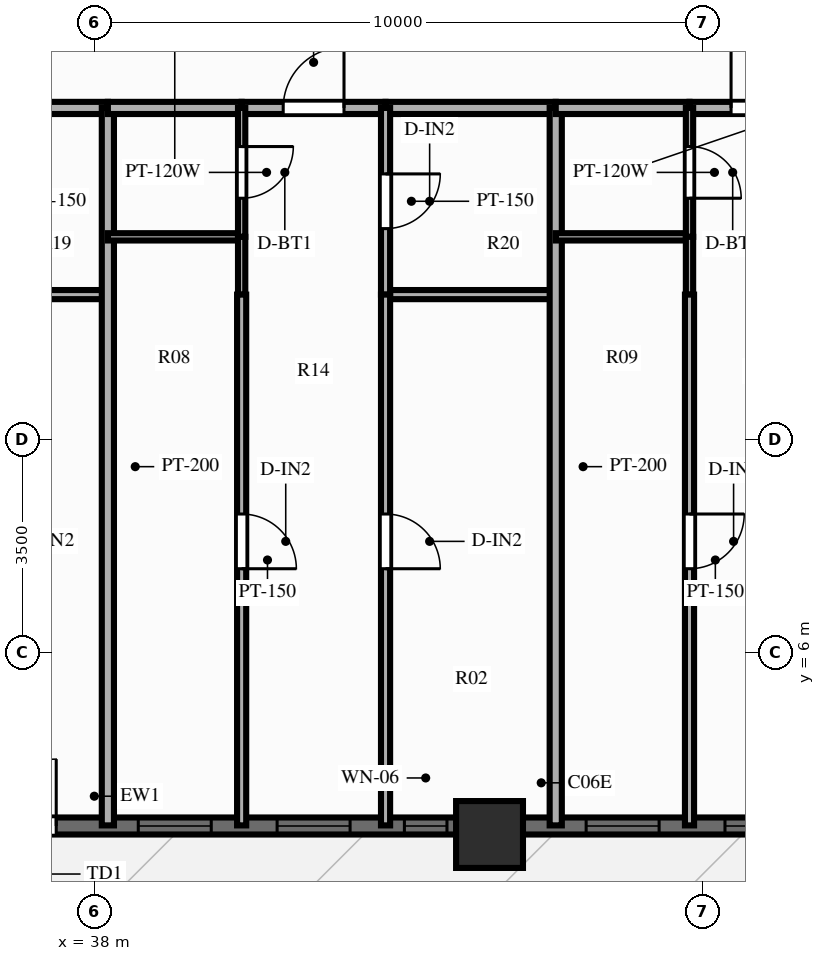
"""IFC4 building model, lengths in metres.
Left out: names, types, materials, properties, quantities, classifications, styles, units other than length and angle.
Written with IfcOpenShell. Run it as: python <this file> out.ifc"""

import sys

from ifc_helpers import new_model, si_unit, direction, frame, frame_2d, origin, origin_2d, place, context, subcontext, project, spatial, rectangle, extrude, source, transform, mapped, element, fill, save


model = new_model("IFC4")
c1 = context("Model", 3, precision=1e-05, world=origin(), true_north=direction((0.0, 1.0)))
c2 = subcontext(c1, "Body", "Model", "MODEL_VIEW")
j1 = project(units=[si_unit("LENGTHUNIT", "METRE"), si_unit("PLANEANGLEUNIT", "RADIAN")], contexts=[c1])
p1 = place(None, origin())
s1 = spatial("IfcSite", under=j1, at=p1, CompositionType="ELEMENT")
p2 = place(p1, origin())
s2 = spatial("IfcBuilding", under=s1, at=p2, CompositionType="ELEMENT")
p3 = place(p2, frame((0.0, 0.0, 25.4)))
s3 = spatial("IfcBuildingStorey", under=s2, at=p3, CompositionType="ELEMENT", Elevation=25.4)
m1 = source(origin(), c2, "Body", "SweptSolid", [
    extrude(rectangle(XDim=1.1, YDim=1.1, at=origin_2d()), origin(), (0.0, 0.0, 1.0), 3.0),
])
p4 = place(p3, frame((44.5, 3.0, 0.0), z_axis=(0.0, 0.0, 1.0), x_axis=(1.0, 0.0, 0.0)))
e1 = element("IfcColumn", 1, at=p4, inside=s3, PredefinedType="COLUMN", context=c2, shape_type="MappedRepresentation", body=[
    mapped(m1, transform((0.0, 0.0, 0.0), scale=1.0)),
])
p5 = place(p3, frame((15.5, 3.14, 0.0), z_axis=(0.0, 0.0, 1.0), x_axis=(1.0, 0.0, 0.0)))
e2 = element("IfcWall", 2, at=p5, inside=s3, PredefinedType="SOLIDWALL", context=c2, shape_type="SweptSolid", body=[
    extrude(rectangle(XDim=45.0, YDim=0.28, at=frame_2d((22.5, 0.0))), origin(), (0.0, 0.0, 1.0), 2.28),
])
p6 = place(p5, frame((0.785, 0.0, 0.25)))
e3 = element("IfcOpeningElement", 3, at=p6, cuts=e2, PredefinedType="OPENING", context=c2, shape_type="SweptSolid", body=[
    extrude(rectangle(XDim=1.2, YDim=1.5, at=frame_2d((0.6, 0.75))), frame((0.0, 0.152, 0.0), z_axis=(0.0, -1.0, 0.0), x_axis=(1.0, 0.0, 0.0)), (0.0, 0.0, 1.0), 0.304),
])
p7 = place(p5, frame((3.033, 0.0, 0.25)))
e4 = element("IfcOpeningElement", 4, at=p7, cuts=e2, PredefinedType="OPENING", context=c2, shape_type="SweptSolid", body=[
    extrude(rectangle(XDim=1.2, YDim=1.5, at=frame_2d((0.6, 0.75))), frame((0.0, 0.152, 0.0), z_axis=(0.0, -1.0, 0.0), x_axis=(1.0, 0.0, 0.0)), (0.0, 0.0, 1.0), 0.304),
])
p8 = place(p5, frame((5.727, 0.0, 0.25)))
e5 = element("IfcOpeningElement", 5, at=p8, cuts=e2, PredefinedType="OPENING", context=c2, shape_type="SweptSolid", body=[
    extrude(rectangle(XDim=1.2, YDim=1.5, at=frame_2d((0.6, 0.75))), frame((0.0, 0.152, 0.0), z_axis=(0.0, -1.0, 0.0), x_axis=(1.0, 0.0, 0.0)), (0.0, 0.0, 1.0), 0.304),
])
p9 = place(p5, frame((8.269, 0.0, 0.25)))
e6 = element("IfcOpeningElement", 6, at=p9, cuts=e2, PredefinedType="OPENING", context=c2, shape_type="SweptSolid", body=[
    extrude(rectangle(XDim=1.2, YDim=1.5, at=frame_2d((0.6, 0.75))), frame((0.0, 0.152, 0.0), z_axis=(0.0, -1.0, 0.0), x_axis=(1.0, 0.0, 0.0)), (0.0, 0.0, 1.0), 0.304),
])
p10 = place(p5, frame((10.621, 0.0, 0.25)))
e7 = element("IfcOpeningElement", 7, at=p10, cuts=e2, PredefinedType="OPENING", context=c2, shape_type="SweptSolid", body=[
    extrude(rectangle(XDim=1.2, YDim=1.5, at=frame_2d((0.6, 0.75))), frame((0.0, 0.152, 0.0), z_axis=(0.0, -1.0, 0.0), x_axis=(1.0, 0.0, 0.0)), (0.0, 0.0, 1.0), 0.304),
])
p11 = place(p5, frame((13.316, 0.0, 0.25)))
e8 = element("IfcOpeningElement", 8, at=p11, cuts=e2, PredefinedType="OPENING", context=c2, shape_type="SweptSolid", body=[
    extrude(rectangle(XDim=1.2, YDim=1.5, at=frame_2d((0.6, 0.75))), frame((0.0, 0.152, 0.0), z_axis=(0.0, -1.0, 0.0), x_axis=(1.0, 0.0, 0.0)), (0.0, 0.0, 1.0), 0.304),
])
p12 = place(p5, frame((16.624, 0.0, 0.25)))
e9 = element("IfcOpeningElement", 9, at=p12, cuts=e2, PredefinedType="OPENING", context=c2, shape_type="SweptSolid", body=[
    extrude(rectangle(XDim=0.7, YDim=1.5, at=frame_2d((0.35, 0.75))), frame((0.0, 0.152, 0.0), z_axis=(0.0, -1.0, 0.0), x_axis=(1.0, 0.0, 0.0)), (0.0, 0.0, 1.0), 0.304),
])
p13 = place(p5, frame((18.141, 0.0, 0.25)))
e10 = element("IfcOpeningElement", 10, at=p13, cuts=e2, PredefinedType="OPENING", context=c2, shape_type="SweptSolid", body=[
    extrude(rectangle(XDim=1.2, YDim=1.5, at=frame_2d((0.6, 0.75))), frame((0.0, 0.152, 0.0), z_axis=(0.0, -1.0, 0.0), x_axis=(1.0, 0.0, 0.0)), (0.0, 0.0, 1.0), 0.304),
])
p14 = place(p5, frame((21.874, 0.0, 0.0), z_axis=(0.0, 0.0, 1.0), x_axis=(-1.0, 0.0, 0.0)))
e11 = element("IfcOpeningElement", 11, at=p14, cuts=e2, PredefinedType="OPENING", context=c2, shape_type="SweptSolid", body=[
    extrude(rectangle(XDim=1.1, YDim=2.15, at=frame_2d((0.55, 1.075))), frame((0.0, 0.152, 0.0), z_axis=(0.0, -1.0, 0.0), x_axis=(1.0, 0.0, 0.0)), (0.0, 0.0, 1.0), 0.304),
])
p15 = place(p5, frame((23.223, 0.0, 0.25)))
e12 = element("IfcOpeningElement", 12, at=p15, cuts=e2, PredefinedType="OPENING", context=c2, shape_type="SweptSolid", body=[
    extrude(rectangle(XDim=1.2, YDim=1.5, at=frame_2d((0.6, 0.75))), frame((0.0, 0.152, 0.0), z_axis=(0.0, -1.0, 0.0), x_axis=(1.0, 0.0, 0.0)), (0.0, 0.0, 1.0), 0.304),
])
p16 = place(p5, frame((25.507, 0.0, 0.25)))
e13 = element("IfcOpeningElement", 13, at=p16, cuts=e2, PredefinedType="OPENING", context=c2, shape_type="SweptSolid", body=[
    extrude(rectangle(XDim=1.2, YDim=1.5, at=frame_2d((0.6, 0.75))), frame((0.0, 0.152, 0.0), z_axis=(0.0, -1.0, 0.0), x_axis=(1.0, 0.0, 0.0)), (0.0, 0.0, 1.0), 0.304),
])
p17 = place(p5, frame((27.6, 0.0, 0.25)))
e14 = element("IfcOpeningElement", 14, at=p17, cuts=e2, PredefinedType="OPENING", context=c2, shape_type="SweptSolid", body=[
    extrude(rectangle(XDim=0.7, YDim=1.5, at=frame_2d((0.35, 0.75))), frame((0.0, 0.152, 0.0), z_axis=(0.0, -1.0, 0.0), x_axis=(1.0, 0.0, 0.0)), (0.0, 0.0, 1.0), 0.304),
])
p18 = place(p5, frame((30.589, 0.0, 0.25)))
e15 = element("IfcOpeningElement", 15, at=p18, cuts=e2, PredefinedType="OPENING", context=c2, shape_type="SweptSolid", body=[
    extrude(rectangle(XDim=1.2, YDim=1.5, at=frame_2d((0.6, 0.75))), frame((0.0, 0.152, 0.0), z_axis=(0.0, -1.0, 0.0), x_axis=(1.0, 0.0, 0.0)), (0.0, 0.0, 1.0), 0.304),
])
p19 = place(p5, frame((32.872, 0.0, 0.25)))
e16 = element("IfcOpeningElement", 16, at=p19, cuts=e2, PredefinedType="OPENING", context=c2, shape_type="SweptSolid", body=[
    extrude(rectangle(XDim=1.2, YDim=1.5, at=frame_2d((0.6, 0.75))), frame((0.0, 0.152, 0.0), z_axis=(0.0, -1.0, 0.0), x_axis=(1.0, 0.0, 0.0)), (0.0, 0.0, 1.0), 0.304),
])
p20 = place(p5, frame((35.455, 0.0, 0.25)))
e17 = element("IfcOpeningElement", 17, at=p20, cuts=e2, PredefinedType="OPENING", context=c2, shape_type="SweptSolid", body=[
    extrude(rectangle(XDim=1.2, YDim=1.5, at=frame_2d((0.6, 0.75))), frame((0.0, 0.152, 0.0), z_axis=(0.0, -1.0, 0.0), x_axis=(1.0, 0.0, 0.0)), (0.0, 0.0, 1.0), 0.304),
])
p21 = place(p5, frame((37.954, 0.0, 0.25)))
e18 = element("IfcOpeningElement", 18, at=p21, cuts=e2, PredefinedType="OPENING", context=c2, shape_type="SweptSolid", body=[
    extrude(rectangle(XDim=1.2, YDim=1.5, at=frame_2d((0.6, 0.75))), frame((0.0, 0.152, 0.0), z_axis=(0.0, -1.0, 0.0), x_axis=(1.0, 0.0, 0.0)), (0.0, 0.0, 1.0), 0.304),
])
p22 = place(p5, frame((40.238, 0.0, 0.25)))
e19 = element("IfcOpeningElement", 19, at=p22, cuts=e2, PredefinedType="OPENING", context=c2, shape_type="SweptSolid", body=[
    extrude(rectangle(XDim=1.2, YDim=1.5, at=frame_2d((0.6, 0.75))), frame((0.0, 0.152, 0.0), z_axis=(0.0, -1.0, 0.0), x_axis=(1.0, 0.0, 0.0)), (0.0, 0.0, 1.0), 0.304),
])
p23 = place(p5, frame((42.716, 0.0, 0.25)))
e20 = element("IfcOpeningElement", 20, at=p23, cuts=e2, PredefinedType="OPENING", context=c2, shape_type="SweptSolid", body=[
    extrude(rectangle(XDim=1.2, YDim=1.5, at=frame_2d((0.6, 0.75))), frame((0.0, 0.152, 0.0), z_axis=(0.0, -1.0, 0.0), x_axis=(1.0, 0.0, 0.0)), (0.0, 0.0, 1.0), 0.304),
])
p24 = place(p3, frame((35.424, 14.95, 0.0), z_axis=(0.0, 0.0, 1.0), x_axis=(1.0, 0.0, 0.0)))
e21 = element("IfcWall", 21, at=p24, inside=s3, PredefinedType="PARTITIONING", context=c2, shape_type="SweptSolid", body=[
    extrude(rectangle(XDim=2.799, YDim=0.2, at=frame_2d((1.399, 0.0))), origin(), (0.0, 0.0, 1.0), 2.79),
])
p25 = place(p3, frame((35.424, 11.88, 0.0), z_axis=(0.0, 0.0, 1.0), x_axis=(1.0, 0.0, 0.0)))
e22 = element("IfcWall", 22, at=p25, inside=s3, PredefinedType="PARTITIONING", context=c2, shape_type="SweptSolid", body=[
    extrude(rectangle(XDim=2.799, YDim=0.15, at=frame_2d((1.399, 0.0))), origin(), (0.0, 0.0, 1.0), 2.79),
])
p26 = place(p3, frame((38.223, 14.95, 0.0), z_axis=(0.0, 0.0, 1.0), x_axis=(0.0, -1.0, 0.0)))
e23 = element("IfcWall", 23, at=p26, inside=s3, PredefinedType="PARTITIONING", context=c2, shape_type="SweptSolid", body=[
    extrude(rectangle(XDim=11.8, YDim=0.2, at=frame_2d((5.9, 0.0))), origin(), (0.0, 0.0, 1.0), 2.79),
])
p27 = place(p3, frame((38.223, 14.95, 0.0), z_axis=(0.0, 0.0, 1.0), x_axis=(1.0, 0.0, 0.0)))
e24 = element("IfcWall", 24, at=p27, inside=s3, PredefinedType="PARTITIONING", context=c2, shape_type="SweptSolid", body=[
    extrude(rectangle(XDim=2.2, YDim=0.2, at=frame_2d((1.1, 0.0))), origin(), (0.0, 0.0, 1.0), 2.79),
])
p28 = place(p3, frame((40.423, 14.95, 0.0), z_axis=(0.0, 0.0, 1.0), x_axis=(1.0, 0.0, 0.0)))
e25 = element("IfcWall", 25, at=p28, inside=s3, PredefinedType="PARTITIONING", context=c2, shape_type="SweptSolid", body=[
    extrude(rectangle(XDim=2.367, YDim=0.2, at=frame_2d((1.183, 0.0))), origin(), (0.0, 0.0, 1.0), 2.79),
])
p29 = place(p28, frame((0.683, 0.0, 0.0)))
e26 = element("IfcOpeningElement", 26, at=p29, cuts=e25, PredefinedType="OPENING", context=c2, shape_type="SweptSolid", body=[
    extrude(rectangle(XDim=1.0, YDim=2.15, at=frame_2d((0.5, 1.075))), frame((0.0, 0.112, 0.0), z_axis=(0.0, -1.0, 0.0), x_axis=(1.0, 0.0, 0.0)), (0.0, 0.0, 1.0), 0.224),
])
p30 = place(p3, frame((42.79, 14.95, 0.0), z_axis=(0.0, 0.0, 1.0), x_axis=(1.0, 0.0, 0.0)))
e27 = element("IfcWall", 27, at=p30, inside=s3, PredefinedType="PARTITIONING", context=c2, shape_type="SweptSolid", body=[
    extrude(rectangle(XDim=2.799, YDim=0.2, at=frame_2d((1.399, 0.0))), origin(), (0.0, 0.0, 1.0), 2.79),
])
p31 = place(p3, frame((38.223, 12.83, 0.0), z_axis=(0.0, 0.0, 1.0), x_axis=(1.0, 0.0, 0.0)))
e28 = element("IfcWall", 28, at=p31, inside=s3, PredefinedType="PARTITIONING", context=c2, shape_type="SweptSolid", body=[
    extrude(rectangle(XDim=2.2, YDim=0.12, at=frame_2d((1.1, 0.0))), origin(), (0.0, 0.0, 1.0), 2.79),
])
p32 = place(p3, frame((42.79, 11.88, 0.0), z_axis=(0.0, 0.0, 1.0), x_axis=(1.0, 0.0, 0.0)))
e29 = element("IfcWall", 29, at=p32, inside=s3, PredefinedType="PARTITIONING", context=c2, shape_type="SweptSolid", body=[
    extrude(rectangle(XDim=2.799, YDim=0.15, at=frame_2d((1.399, 0.0))), origin(), (0.0, 0.0, 1.0), 2.79),
])
p33 = place(p3, frame((40.423, 14.95, 0.0), z_axis=(0.0, 0.0, 1.0), x_axis=(0.0, -1.0, 0.0)))
e30 = element("IfcWall", 30, at=p33, inside=s3, PredefinedType="PARTITIONING", context=c2, shape_type="SweptSolid", body=[
    extrude(rectangle(XDim=2.12, YDim=0.12, at=frame_2d((1.06, 0.0))), origin(), (0.0, 0.0, 1.0), 2.79),
])
p34 = place(p33, frame((0.635, 0.0, 0.0)))
e31 = element("IfcOpeningElement", 31, at=p34, cuts=e30, PredefinedType="OPENING", context=c2, shape_type="SweptSolid", body=[
    extrude(rectangle(XDim=0.85, YDim=2.05, at=frame_2d((0.425, 1.025))), frame((0.0, 0.072, 0.0), z_axis=(0.0, -1.0, 0.0), x_axis=(1.0, 0.0, 0.0)), (0.0, 0.0, 1.0), 0.144),
])
p35 = place(p3, frame((40.423, 12.83, 0.0), z_axis=(0.0, 0.0, 1.0), x_axis=(0.0, -1.0, 0.0)))
e32 = element("IfcWall", 32, at=p35, inside=s3, PredefinedType="PARTITIONING", context=c2, shape_type="SweptSolid", body=[
    extrude(rectangle(XDim=0.95, YDim=0.12, at=frame_2d((0.475, 0.0))), origin(), (0.0, 0.0, 1.0), 2.79),
])
p36 = place(p3, frame((40.423, 11.88, 0.0), z_axis=(0.0, 0.0, 1.0), x_axis=(0.0, -1.0, 0.0)))
e33 = element("IfcWall", 33, at=p36, inside=s3, PredefinedType="PARTITIONING", context=c2, shape_type="SweptSolid", body=[
    extrude(rectangle(XDim=8.73, YDim=0.15, at=frame_2d((4.365, 0.0))), origin(), (0.0, 0.0, 1.0), 2.79),
])
p37 = place(p36, frame((3.609, 0.0, 0.0)))
e34 = element("IfcOpeningElement", 34, at=p37, cuts=e33, PredefinedType="OPENING", context=c2, shape_type="SweptSolid", body=[
    extrude(rectangle(XDim=0.9, YDim=2.1, at=frame_2d((0.45, 1.05))), frame((0.0, 0.087, 0.0), z_axis=(0.0, -1.0, 0.0), x_axis=(1.0, 0.0, 0.0)), (0.0, 0.0, 1.0), 0.174),
])
p38 = place(p3, frame((42.79, 14.95, 0.0), z_axis=(0.0, 0.0, 1.0), x_axis=(0.0, -1.0, 0.0)))
e35 = element("IfcWall", 35, at=p38, inside=s3, PredefinedType="PARTITIONING", context=c2, shape_type="SweptSolid", body=[
    extrude(rectangle(XDim=3.07, YDim=0.15, at=frame_2d((1.535, 0.0))), origin(), (0.0, 0.0, 1.0), 2.79),
])
p39 = place(p38, frame((1.085, 0.0, 0.0)))
e36 = element("IfcOpeningElement", 36, at=p39, cuts=e35, PredefinedType="OPENING", context=c2, shape_type="SweptSolid", body=[
    extrude(rectangle(XDim=0.9, YDim=2.1, at=frame_2d((0.45, 1.05))), frame((0.0, 0.087, 0.0), z_axis=(0.0, -1.0, 0.0), x_axis=(1.0, 0.0, 0.0)), (0.0, 0.0, 1.0), 0.174),
])
p40 = place(p3, frame((42.79, 11.88, 0.0), z_axis=(0.0, 0.0, 1.0), x_axis=(0.0, -1.0, 0.0)))
e37 = element("IfcWall", 37, at=p40, inside=s3, PredefinedType="PARTITIONING", context=c2, shape_type="SweptSolid", body=[
    extrude(rectangle(XDim=8.73, YDim=0.15, at=frame_2d((4.365, 0.0))), origin(), (0.0, 0.0, 1.0), 2.79),
])
p41 = place(p40, frame((3.609, 0.0, 0.0)))
e38 = element("IfcOpeningElement", 38, at=p41, cuts=e37, PredefinedType="OPENING", context=c2, shape_type="SweptSolid", body=[
    extrude(rectangle(XDim=0.9, YDim=2.1, at=frame_2d((0.45, 1.05))), frame((0.0, 0.087, 0.0), z_axis=(0.0, -1.0, 0.0), x_axis=(1.0, 0.0, 0.0)), (0.0, 0.0, 1.0), 0.174),
])
p42 = place(p3, frame((45.589, 14.95, 0.0), z_axis=(0.0, 0.0, 1.0), x_axis=(0.0, -1.0, 0.0)))
e39 = element("IfcWall", 39, at=p42, inside=s3, PredefinedType="PARTITIONING", context=c2, shape_type="SweptSolid", body=[
    extrude(rectangle(XDim=11.8, YDim=0.2, at=frame_2d((5.9, 0.0))), origin(), (0.0, 0.0, 1.0), 2.24),
])
p43 = place(p3, frame((45.589, 14.95, 0.0), z_axis=(0.0, 0.0, 1.0), x_axis=(1.0, 0.0, 0.0)))
e40 = element("IfcWall", 40, at=p43, inside=s3, PredefinedType="PARTITIONING", context=c2, shape_type="SweptSolid", body=[
    extrude(rectangle(XDim=2.2, YDim=0.2, at=frame_2d((1.1, 0.0))), origin(), (0.0, 0.0, 1.0), 2.79),
])
p44 = place(p3, frame((47.789, 14.95, 0.0), z_axis=(0.0, 0.0, 1.0), x_axis=(1.0, 0.0, 0.0)))
e41 = element("IfcWall", 41, at=p44, inside=s3, PredefinedType="PARTITIONING", context=c2, shape_type="SweptSolid", body=[
    extrude(rectangle(XDim=2.367, YDim=0.2, at=frame_2d((1.183, 0.0))), origin(), (0.0, 0.0, 1.0), 2.79),
])
p45 = place(p44, frame((0.683, 0.0, 0.0)))
e42 = element("IfcOpeningElement", 42, at=p45, cuts=e41, PredefinedType="OPENING", context=c2, shape_type="SweptSolid", body=[
    extrude(rectangle(XDim=1.0, YDim=2.15, at=frame_2d((0.5, 1.075))), frame((0.0, 0.112, 0.0), z_axis=(0.0, -1.0, 0.0), x_axis=(1.0, 0.0, 0.0)), (0.0, 0.0, 1.0), 0.224),
])
p46 = place(p3, frame((45.589, 12.83, 0.0), z_axis=(0.0, 0.0, 1.0), x_axis=(1.0, 0.0, 0.0)))
e43 = element("IfcWall", 43, at=p46, inside=s3, PredefinedType="PARTITIONING", context=c2, shape_type="SweptSolid", body=[
    extrude(rectangle(XDim=2.2, YDim=0.12, at=frame_2d((1.1, 0.0))), origin(), (0.0, 0.0, 1.0), 2.79),
])
p47 = place(p3, frame((47.789, 14.95, 0.0), z_axis=(0.0, 0.0, 1.0), x_axis=(0.0, -1.0, 0.0)))
e44 = element("IfcWall", 44, at=p47, inside=s3, PredefinedType="PARTITIONING", context=c2, shape_type="SweptSolid", body=[
    extrude(rectangle(XDim=2.12, YDim=0.12, at=frame_2d((1.06, 0.0))), origin(), (0.0, 0.0, 1.0), 2.79),
])
p48 = place(p47, frame((0.635, 0.0, 0.0)))
e45 = element("IfcOpeningElement", 45, at=p48, cuts=e44, PredefinedType="OPENING", context=c2, shape_type="SweptSolid", body=[
    extrude(rectangle(XDim=0.85, YDim=2.05, at=frame_2d((0.425, 1.025))), frame((0.0, 0.072, 0.0), z_axis=(0.0, -1.0, 0.0), x_axis=(1.0, 0.0, 0.0)), (0.0, 0.0, 1.0), 0.144),
])
p49 = place(p3, frame((47.789, 12.83, 0.0), z_axis=(0.0, 0.0, 1.0), x_axis=(0.0, -1.0, 0.0)))
e46 = element("IfcWall", 46, at=p49, inside=s3, PredefinedType="PARTITIONING", context=c2, shape_type="SweptSolid", body=[
    extrude(rectangle(XDim=0.95, YDim=0.12, at=frame_2d((0.475, 0.0))), origin(), (0.0, 0.0, 1.0), 2.79),
])
p50 = place(p3, frame((47.789, 11.88, 0.0), z_axis=(0.0, 0.0, 1.0), x_axis=(0.0, -1.0, 0.0)))
e47 = element("IfcWall", 47, at=p50, inside=s3, PredefinedType="PARTITIONING", context=c2, shape_type="SweptSolid", body=[
    extrude(rectangle(XDim=8.73, YDim=0.15, at=frame_2d((4.365, 0.0))), origin(), (0.0, 0.0, 1.0), 2.79),
])
p51 = place(p50, frame((3.609, 0.0, 0.0)))
e48 = element("IfcOpeningElement", 48, at=p51, cuts=e47, PredefinedType="OPENING", context=c2, shape_type="SweptSolid", body=[
    extrude(rectangle(XDim=0.9, YDim=2.1, at=frame_2d((0.45, 1.05))), frame((0.0, 0.087, 0.0), z_axis=(0.0, -1.0, 0.0), x_axis=(1.0, 0.0, 0.0)), (0.0, 0.0, 1.0), 0.174),
])
m2 = source(origin(), c2, "Body", "SweptSolid", [
    extrude(rectangle(XDim=1.1, YDim=2.15, at=frame_2d((0.55, 1.075))), frame((0.0, 0.025, 0.0), z_axis=(0.0, -1.0, 0.0), x_axis=(1.0, 0.0, 0.0)), (0.0, 0.0, 1.0), 0.05),
])
p52 = place(p14, origin())
e49 = element("IfcDoor", 49, at=p52, inside=s3, OperationType="SINGLE_SWING_LEFT", PredefinedType="DOOR", context=c2, shape_type="MappedRepresentation", body=[
    mapped(m2, transform((0.0, 0.0, 0.0), scale=1.0)),
])
fill(e11, e49)
m3 = source(origin(), c2, "Body", "SweptSolid", [
    extrude(rectangle(XDim=1.2, YDim=1.5, at=frame_2d((0.6, 0.75))), frame((0.0, 0.03, 0.0), z_axis=(0.0, -1.0, 0.0), x_axis=(1.0, 0.0, 0.0)), (0.0, 0.0, 1.0), 0.06),
])
p53 = place(p15, origin())
e50 = element("IfcWindow", 50, at=p53, inside=s3, PartitioningType="SINGLE_PANEL", PredefinedType="WINDOW", context=c2, shape_type="MappedRepresentation", body=[
    mapped(m3, transform((0.0, 0.0, 0.0), scale=1.0)),
])
fill(e12, e50)
p54 = place(p16, origin())
e51 = element("IfcWindow", 51, at=p54, inside=s3, PartitioningType="SINGLE_PANEL", PredefinedType="WINDOW", context=c2, shape_type="MappedRepresentation", body=[
    mapped(m3, transform((0.0, 0.0, 0.0), scale=1.0)),
])
fill(e13, e51)
m4 = source(origin(), c2, "Body", "SweptSolid", [
    extrude(rectangle(XDim=0.7, YDim=1.5, at=frame_2d((0.35, 0.75))), frame((0.0, 0.03, 0.0), z_axis=(0.0, -1.0, 0.0), x_axis=(1.0, 0.0, 0.0)), (0.0, 0.0, 1.0), 0.06),
])
p55 = place(p17, origin())
e52 = element("IfcWindow", 52, at=p55, inside=s3, PartitioningType="SINGLE_PANEL", PredefinedType="WINDOW", context=c2, shape_type="MappedRepresentation", body=[
    mapped(m4, transform((0.0, 0.0, 0.0), scale=1.0)),
])
fill(e14, e52)
p56 = place(p18, origin())
e53 = element("IfcWindow", 53, at=p56, inside=s3, PartitioningType="SINGLE_PANEL", PredefinedType="WINDOW", context=c2, shape_type="MappedRepresentation", body=[
    mapped(m3, transform((0.0, 0.0, 0.0), scale=1.0)),
])
fill(e15, e53)
p57 = place(p19, origin())
e54 = element("IfcWindow", 54, at=p57, inside=s3, PartitioningType="SINGLE_PANEL", PredefinedType="WINDOW", context=c2, shape_type="MappedRepresentation", body=[
    mapped(m3, transform((0.0, 0.0, 0.0), scale=1.0)),
])
fill(e16, e54)
m5 = source(origin(), c2, "Body", "SweptSolid", [
    extrude(rectangle(XDim=1.0, YDim=2.15, at=frame_2d((0.5, 1.075))), frame((0.0, 0.025, 0.0), z_axis=(0.0, -1.0, 0.0), x_axis=(1.0, 0.0, 0.0)), (0.0, 0.0, 1.0), 0.05),
])
p58 = place(p29, origin())
e55 = element("IfcDoor", 55, at=p58, inside=s3, OperationType="SINGLE_SWING_RIGHT", PredefinedType="DOOR", context=c2, shape_type="MappedRepresentation", body=[
    mapped(m5, transform((0.0, 0.0, 0.0), scale=1.0)),
])
fill(e26, e55)
m6 = source(origin(), c2, "Body", "SweptSolid", [
    extrude(rectangle(XDim=0.85, YDim=2.05, at=frame_2d((0.425, 1.025))), frame((0.0, 0.025, 0.0), z_axis=(0.0, -1.0, 0.0), x_axis=(1.0, 0.0, 0.0)), (0.0, 0.0, 1.0), 0.05),
])
p59 = place(p34, origin())
e56 = element("IfcDoor", 56, at=p59, inside=s3, OperationType="SINGLE_SWING_LEFT", PredefinedType="DOOR", context=c2, shape_type="MappedRepresentation", body=[
    mapped(m6, transform((0.0, 0.0, 0.0), scale=1.0)),
])
fill(e31, e56)
m7 = source(origin(), c2, "Body", "SweptSolid", [
    extrude(rectangle(XDim=0.9, YDim=2.1, at=frame_2d((0.45, 1.05))), frame((0.0, 0.025, 0.0), z_axis=(0.0, -1.0, 0.0), x_axis=(1.0, 0.0, 0.0)), (0.0, 0.0, 1.0), 0.05),
])
p60 = place(p37, origin())
e57 = element("IfcDoor", 57, at=p60, inside=s3, OperationType="SINGLE_SWING_RIGHT", PredefinedType="DOOR", context=c2, shape_type="MappedRepresentation", body=[
    mapped(m7, transform((0.0, 0.0, 0.0), scale=1.0)),
])
fill(e34, e57)
p61 = place(p39, origin())
e58 = element("IfcDoor", 58, at=p61, inside=s3, OperationType="SINGLE_SWING_LEFT", PredefinedType="DOOR", context=c2, shape_type="MappedRepresentation", body=[
    mapped(m7, transform((0.0, 0.0, 0.0), scale=1.0)),
])
fill(e36, e58)
p62 = place(p41, origin())
e59 = element("IfcDoor", 59, at=p62, inside=s3, OperationType="SINGLE_SWING_RIGHT", PredefinedType="DOOR", context=c2, shape_type="MappedRepresentation", body=[
    mapped(m7, transform((0.0, 0.0, 0.0), scale=1.0)),
])
fill(e38, e59)
p63 = place(p45, origin())
e60 = element("IfcDoor", 60, at=p63, inside=s3, OperationType="SINGLE_SWING_LEFT", PredefinedType="DOOR", context=c2, shape_type="MappedRepresentation", body=[
    mapped(m5, transform((0.0, 0.0, 0.0), scale=1.0)),
])
fill(e42, e60)
p64 = place(p48, origin())
e61 = element("IfcDoor", 61, at=p64, inside=s3, OperationType="SINGLE_SWING_RIGHT", PredefinedType="DOOR", context=c2, shape_type="MappedRepresentation", body=[
    mapped(m6, transform((0.0, 0.0, 0.0), scale=1.0)),
])
fill(e45, e61)
p65 = place(p51, origin())
e62 = element("IfcDoor", 62, at=p65, inside=s3, OperationType="SINGLE_SWING_LEFT", PredefinedType="DOOR", context=c2, shape_type="MappedRepresentation", body=[
    mapped(m7, transform((0.0, 0.0, 0.0), scale=1.0)),
])
fill(e48, e62)
save(model, sys.argv[1])
